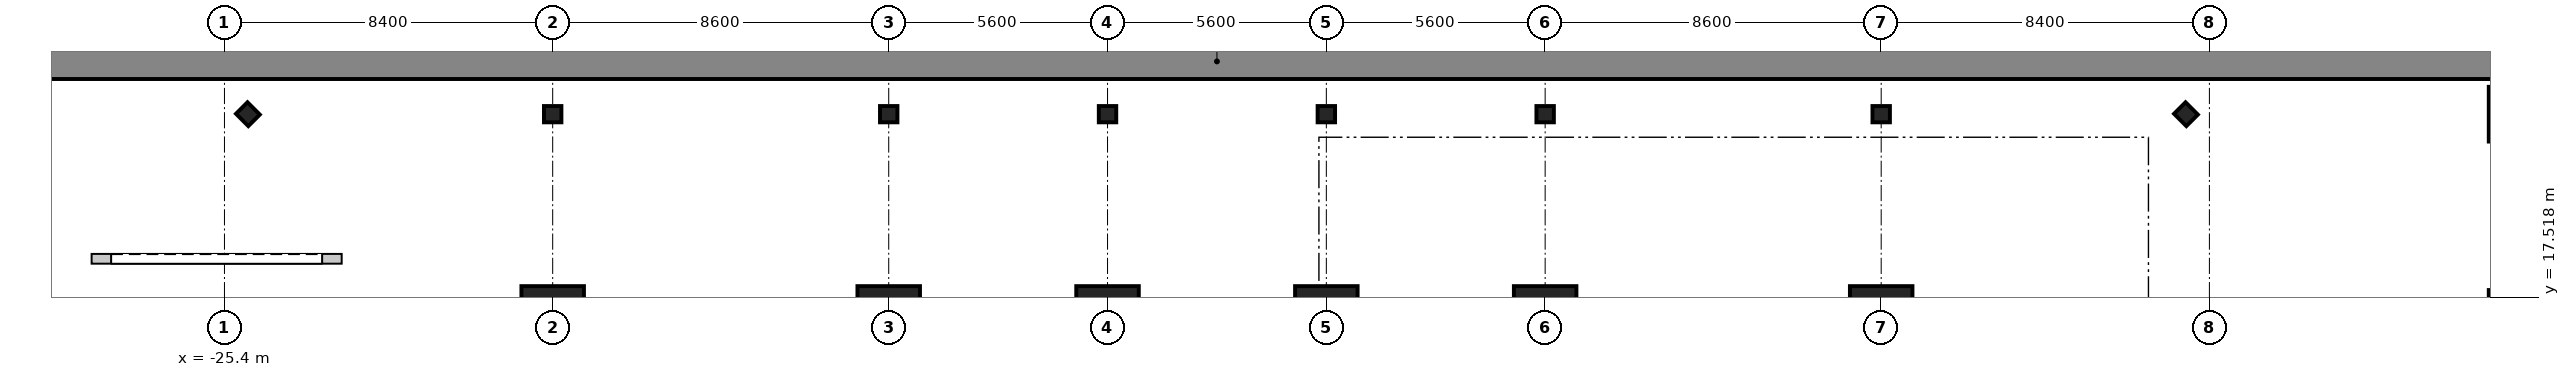
"""IFC4 building model, lengths in metres.
Left out: names, types, materials, properties, quantities, classifications, styles, units other than length and angle.
Written with IfcOpenShell. Run it as: python <this file> out.ifc"""

import sys

from ifc_helpers import new_model, si_unit, direction, frame, frame_2d, origin, origin_2d, place, context, subcontext, project, spatial, rectangle, i_section, extrude, source, transform, mapped, element, fill, save


model = new_model("IFC4")
c1 = context("Model", 3, precision=1e-05, world=origin(), true_north=direction((0.0, 1.0)))
c2 = subcontext(c1, "Body", "Model", "MODEL_VIEW")
j1 = project(units=[si_unit("LENGTHUNIT", "METRE"), si_unit("PLANEANGLEUNIT", "RADIAN")], contexts=[c1])
p1 = place(None, origin())
s1 = spatial("IfcSite", under=j1, at=p1, CompositionType="ELEMENT")
p2 = place(p1, origin())
s2 = spatial("IfcBuilding", under=s1, at=p2, CompositionType="ELEMENT")
p3 = place(p2, frame((0.0, 0.0, -5.4)))
s3 = spatial("IfcBuildingStorey", under=s2, at=p3, CompositionType="ELEMENT", Elevation=-5.4)
m1 = source(origin(), c2, "Body", "SweptSolid", [
    extrude(rectangle(XDim=76.0, YDim=0.9, at=frame_2d((38.0, 0.0))), origin(), (0.0, 0.0, 1.0), 4.98),
])
p4 = place(p3, frame((-38.0, 23.55, 0.0), z_axis=(0.0, 0.0, 1.0), x_axis=(1.0, 0.0, 0.0)))
e1 = element("IfcWall", 1, at=p4, inside=s3, PredefinedType="SHEAR", context=c2, shape_type="MappedRepresentation", body=[
    mapped(m1, transform((0.0, 0.0, 0.0), scale=1.0)),
])
m2 = source(origin(), c2, "Body", "SweptSolid", [
    extrude(rectangle(XDim=1.6, YDim=1.6, at=origin_2d()), origin(), (0.0, 0.0, 1.0), 5.355),
])
for number, where, z_axis, x_axis in (
    (2, (-17.0, 17.0, 0.0), (0.0, 0.0, 1.0), (1.0, 0.0, 0.0)),
    (3, (-8.4, 17.0, 0.0), (0.0, 0.0, 1.0), (1.0, 0.0, 0.0)),
    (4, (-2.8, 17.0, 0.0), (0.0, 0.0, 1.0), (1.0, 0.0, 0.0)),
    (5, (2.8, 17.0, 0.0), (0.0, 0.0, 1.0), (1.0, 0.0, 0.0)),
    (6, (8.4, 17.0, 0.0), (0.0, 0.0, 1.0), (1.0, 0.0, 0.0)),
    (7, (17.0, 17.0, 0.0), (0.0, 0.0, 1.0), (1.0, 0.0, 0.0)),
):
    element("IfcColumn", number, at=place(p3, frame(where, z_axis=z_axis, x_axis=x_axis)), inside=s3, PredefinedType="COLUMN", context=c2, shape_type="MappedRepresentation", body=[
        mapped(m2, transform((0.0, 0.0, 0.0), scale=1.0)),
    ])
m3 = source(origin(), c2, "Body", "SweptSolid", [
    extrude(rectangle(XDim=0.9, YDim=1.4, at=origin_2d()), origin(), (0.0, 0.0, 1.0), 5.355),
])
for number, where, z_axis, x_axis in (
    (8, (33.0, 17.0, 0.0), (0.0, 0.0, 1.0), (1.0, 0.0, 0.0)),
    (9, (33.0, 22.2, 0.0), (0.0, 0.0, 1.0), (1.0, 0.0, 0.0)),
):
    element("IfcColumn", number, at=place(p3, frame(where, z_axis=z_axis, x_axis=x_axis)), inside=s3, PredefinedType="PILASTER", context=c2, shape_type="MappedRepresentation", body=[
        mapped(m3, transform((0.0, 0.0, 0.0), scale=1.0)),
    ])
m4 = source(origin(), c2, "Body", "SweptSolid", [
    extrude(i_section(OverallWidth=0.416, OverallDepth=0.446, WebThickness=0.025, FlangeThickness=0.04, at=origin_2d()), origin(), (0.0, 0.0, 1.0), 5.355),
])
for number, where, z_axis, x_axis in (
    (10, (-17.0, 22.2, 0.0), (0.0, 0.0, 1.0), (0.0, 1.0, 0.0)),
    (11, (-8.4, 22.2, 0.0), (0.0, 0.0, 1.0), (0.0, 1.0, 0.0)),
    (12, (-2.8, 22.2, 0.0), (0.0, 0.0, 1.0), (0.0, 1.0, 0.0)),
    (13, (2.8, 22.2, 0.0), (0.0, 0.0, 1.0), (0.0, 1.0, 0.0)),
    (14, (8.4, 22.2, 0.0), (0.0, 0.0, 1.0), (0.0, 1.0, 0.0)),
    (15, (17.0, 22.2, 0.0), (0.0, 0.0, 1.0), (0.0, 1.0, 0.0)),
    (16, (-24.8, 22.2, 0.0), (0.0, 0.0, 1.0), (0.707, 0.707, 0.0)),
    (17, (24.8, 22.2, 0.0), (0.0, 0.0, 1.0), (0.707, 0.707, 0.0)),
):
    element("IfcColumn", number, at=place(p3, frame(where, z_axis=z_axis, x_axis=x_axis)), inside=s3, PredefinedType="COLUMN", context=c2, shape_type="MappedRepresentation", body=[
        mapped(m4, transform((0.0, 0.0, 0.0), scale=1.0)),
    ])
m5 = source(origin(), c2, "Body", "SweptSolid", [
    extrude(rectangle(XDim=6.4, YDim=0.25, at=frame_2d((3.2, 0.0))), origin(), (0.0, 0.0, 1.0), 4.95),
])
p5 = place(p3, frame((-28.8, 18.5, 0.0), z_axis=(0.0, 0.0, 1.0), x_axis=(1.0, 0.0, 0.0)))
e18 = element("IfcWall", 18, at=p5, inside=s3, PredefinedType="PARTITIONING", context=c2, shape_type="MappedRepresentation", body=[
    mapped(m5, transform((0.0, 0.0, 0.0), scale=1.0)),
])
p6 = place(p5, frame((0.5, 0.0, 0.0)))
e19 = element("IfcOpeningElement", 19, at=p6, cuts=e18, PredefinedType="OPENING", context=c2, shape_type="SweptSolid", body=[
    extrude(rectangle(XDim=5.4, YDim=3.1, at=frame_2d((2.7, 1.55))), frame((0.0, 0.135, 0.0), z_axis=(0.0, -1.0, 0.0), x_axis=(1.0, 0.0, 0.0)), (0.0, 0.0, 1.0), 0.27),
])
m6 = source(origin(), c2, "Body", "SweptSolid", [
    extrude(rectangle(XDim=5.4, YDim=3.1, at=frame_2d((2.7, 1.55))), frame((0.0, 0.025, 0.0), z_axis=(0.0, -1.0, 0.0), x_axis=(1.0, 0.0, 0.0)), (0.0, 0.0, 1.0), 0.05),
])
p7 = place(p6, origin())
e20 = element("IfcDoor", 20, at=p7, inside=s3, OperationType="ROLLINGUP", PredefinedType="GATE", context=c2, shape_type="MappedRepresentation", body=[
    mapped(m6, transform((0.0, 0.0, 0.0), scale=1.0)),
])
fill(e19, e20)
save(model, sys.argv[1])
